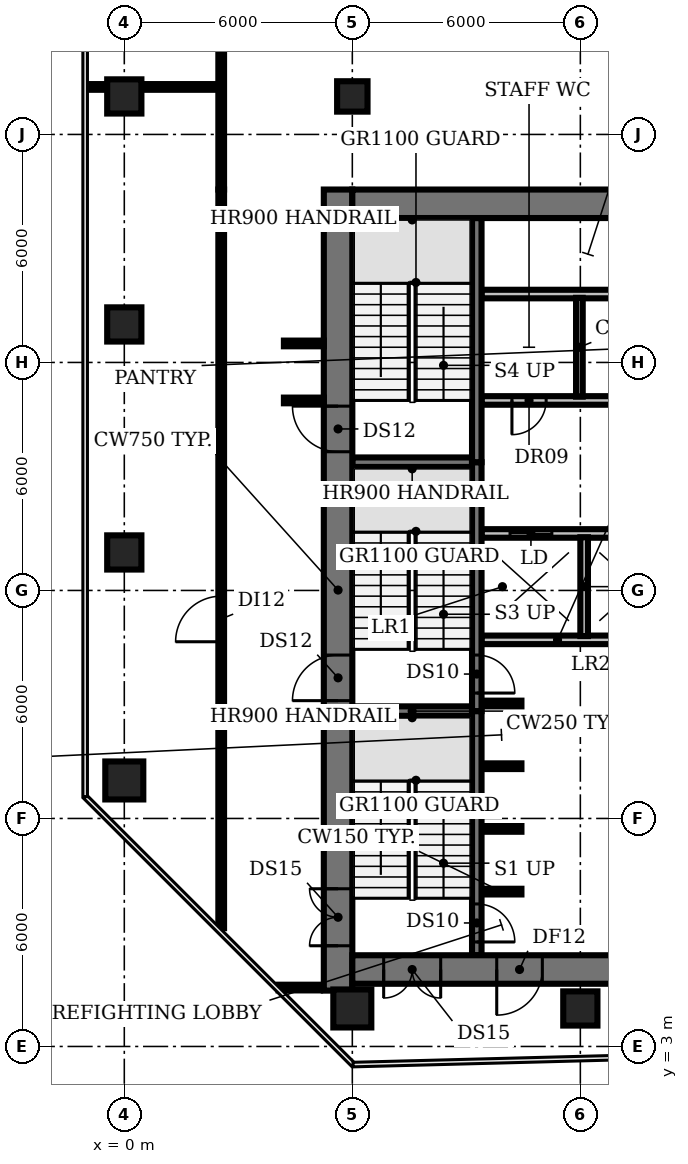
"""IFC4 building model, lengths in metres.
Left out: names, types, materials, properties, quantities, classifications, styles, units other than length and angle.
Written with IfcOpenShell. Run it as: python <this file> out.ifc"""

import sys

from ifc_helpers import new_model, si_unit, direction, frame, frame_2d, origin, origin_2d, place, context, subcontext, project, spatial, rectangle, circle, extrude, element, fill, save


model = new_model("IFC4")
c1 = context("Model", 3, precision=1e-05, world=origin(), true_north=direction((0.0, 1.0)))
c2 = subcontext(c1, "Body", "Model", "MODEL_VIEW")
j1 = project(units=[si_unit("LENGTHUNIT", "METRE"), si_unit("PLANEANGLEUNIT", "RADIAN")], contexts=[c1])
p1 = place(None, origin())
s1 = spatial("IfcSite", under=j1, at=p1, CompositionType="ELEMENT")
p2 = place(p1, origin())
s2 = spatial("IfcBuilding", under=s1, at=p2, CompositionType="ELEMENT")
p3 = place(p2, frame((0.0, 0.0, 104.6)))
s3 = spatial("IfcBuildingStorey", under=s2, at=p3, CompositionType="ELEMENT", Elevation=104.6)
p4 = place(p3, frame((0.0, 10.0, 0.0), z_axis=(0.0, 0.0, 1.0), x_axis=(1.0, 0.0, 0.0)))
e1 = element("IfcColumn", 1, at=p4, inside=s3, PredefinedType="COLUMN", context=c2, shape_type="SweptSolid", body=[
    extrude(circle(Radius=0.5, at=origin_2d()), origin(), (0.0, 0.0, 1.0), 3.85),
])
for number, where, z_axis, x_axis in (
    (2, (0.0, 16.0, 0.0), (0.0, 0.0, 1.0), (1.0, 0.0, 0.0)),
    (3, (0.0, 22.0, 0.0), (0.0, 0.0, 1.0), (1.0, 0.0, 0.0)),
    (4, (0.0, 28.0, 0.0), (0.0, 0.0, 1.0), (1.0, 0.0, 0.0)),
):
    element("IfcColumn", number, at=place(p3, frame(where, z_axis=z_axis, x_axis=x_axis)), inside=s3, PredefinedType="COLUMN", context=c2, shape_type="SweptSolid", body=[
        extrude(rectangle(XDim=0.9, YDim=0.9, at=origin_2d()), origin(), (0.0, 0.0, 1.0), 3.85),
    ])
p5 = place(p3, frame((6.0, 4.0, 0.0), z_axis=(0.0, 0.0, 1.0), x_axis=(1.0, 0.0, 0.0)))
e5 = element("IfcColumn", 5, at=p5, inside=s3, PredefinedType="COLUMN", context=c2, shape_type="SweptSolid", body=[
    extrude(circle(Radius=0.5, at=origin_2d()), origin(), (0.0, 0.0, 1.0), 3.85),
])
p6 = place(p3, frame((6.0, 28.0, 0.0), z_axis=(0.0, 0.0, 1.0), x_axis=(1.0, 0.0, 0.0)))
e6 = element("IfcColumn", 6, at=p6, inside=s3, PredefinedType="COLUMN", context=c2, shape_type="SweptSolid", body=[
    extrude(rectangle(XDim=0.8, YDim=0.8, at=origin_2d()), origin(), (0.0, 0.0, 1.0), 3.85),
])
p7 = place(p3, frame((12.0, 4.0, 0.0), z_axis=(0.0, 0.0, 1.0), x_axis=(1.0, 0.0, 0.0)))
e7 = element("IfcColumn", 7, at=p7, inside=s3, PredefinedType="COLUMN", context=c2, shape_type="SweptSolid", body=[
    extrude(rectangle(XDim=0.9, YDim=0.9, at=origin_2d()), origin(), (0.0, 0.0, 1.0), 3.85),
])
for number, where, z_axis, x_axis in (
    (8, (9.4, 7.075, 0.0), (0.0, 0.0, 1.0), (1.0, 0.0, 0.0)),
    (9, (9.4, 8.725, 0.0), (0.0, 0.0, 1.0), (1.0, 0.0, 0.0)),
    (10, (9.4, 10.375, 0.0), (0.0, 0.0, 1.0), (1.0, 0.0, 0.0)),
):
    element("IfcWall", number, at=place(p3, frame(where, z_axis=z_axis, x_axis=x_axis)), inside=s3, PredefinedType="SHEAR", context=c2, shape_type="SweptSolid", body=[
        extrude(rectangle(XDim=1.05, YDim=0.15, at=frame_2d((0.525, 0.0))), origin(), (0.0, 0.0, 1.0), 3.85),
    ])
p8 = place(p3, frame((6.0, 11.825, 0.0), z_axis=(0.0, 0.0, 1.0), x_axis=(1.0, 0.0, 0.0)))
e11 = element("IfcWall", 11, at=p8, inside=s3, PredefinedType="SHEAR", context=c2, shape_type="SweptSolid", body=[
    extrude(rectangle(XDim=3.15, YDim=0.25, at=frame_2d((1.575, 0.0))), origin(), (0.0, 0.0, 1.0), 3.85),
])
p9 = place(p3, frame((9.4, 12.025, 0.0), z_axis=(0.0, 0.0, 1.0), x_axis=(1.0, 0.0, 0.0)))
e12 = element("IfcWall", 12, at=p9, inside=s3, PredefinedType="SHEAR", context=c2, shape_type="SweptSolid", body=[
    extrude(rectangle(XDim=1.05, YDim=0.15, at=frame_2d((0.525, 0.0))), origin(), (0.0, 0.0, 1.0), 3.85),
])
p10 = place(p3, frame((9.4, 13.7, 0.0), z_axis=(0.0, 0.0, 1.0), x_axis=(1.0, 0.0, 0.0)))
e13 = element("IfcWall", 13, at=p10, inside=s3, PredefinedType="PARTITIONING", context=c2, shape_type="SweptSolid", body=[
    extrude(rectangle(XDim=4.0, YDim=0.225, at=frame_2d((2.0, 0.0))), origin(), (0.0, 0.0, 1.0), 3.85),
])
p11 = place(p3, frame((9.4, 16.5, 0.0), z_axis=(0.0, 0.0, 1.0), x_axis=(1.0, 0.0, 0.0)))
e14 = element("IfcWall", 14, at=p11, inside=s3, PredefinedType="PARTITIONING", context=c2, shape_type="SweptSolid", body=[
    extrude(rectangle(XDim=14.6, YDim=0.225, at=frame_2d((7.3, 0.0))), origin(), (0.0, 0.0, 1.0), 3.85),
])
p12 = place(p11, frame((0.75, 0.0, 0.0)))
e15 = element("IfcOpeningElement", 15, at=p12, cuts=e14, PredefinedType="OPENING", context=c2, shape_type="SweptSolid", body=[
    extrude(rectangle(XDim=1.1, YDim=2.1, at=frame_2d((0.55, 1.05))), frame((0.0, 0.123, 0.0), z_axis=(0.0, -1.0, 0.0), x_axis=(1.0, 0.0, 0.0)), (0.0, 0.0, 1.0), 0.245),
])
p13 = place(p11, frame((3.55, 0.0, 0.0)))
e16 = element("IfcOpeningElement", 16, at=p13, cuts=e14, PredefinedType="OPENING", context=c2, shape_type="SweptSolid", body=[
    extrude(rectangle(XDim=1.1, YDim=2.1, at=frame_2d((0.55, 1.05))), frame((0.0, 0.123, 0.0), z_axis=(0.0, -1.0, 0.0), x_axis=(1.0, 0.0, 0.0)), (0.0, 0.0, 1.0), 0.245),
])
p14 = place(p11, frame((6.35, 0.0, 0.0)))
e17 = element("IfcOpeningElement", 17, at=p14, cuts=e14, PredefinedType="OPENING", context=c2, shape_type="SweptSolid", body=[
    extrude(rectangle(XDim=1.1, YDim=2.1, at=frame_2d((0.55, 1.05))), frame((0.0, 0.123, 0.0), z_axis=(0.0, -1.0, 0.0), x_axis=(1.0, 0.0, 0.0)), (0.0, 0.0, 1.0), 0.245),
])
p15 = place(p11, frame((9.15, 0.0, 0.0)))
e18 = element("IfcOpeningElement", 18, at=p15, cuts=e14, PredefinedType="OPENING", context=c2, shape_type="SweptSolid", body=[
    extrude(rectangle(XDim=1.1, YDim=2.1, at=frame_2d((0.55, 1.05))), frame((0.0, 0.123, 0.0), z_axis=(0.0, -1.0, 0.0), x_axis=(1.0, 0.0, 0.0)), (0.0, 0.0, 1.0), 0.245),
])
p16 = place(p11, frame((11.647, 0.0, 0.0)))
e19 = element("IfcOpeningElement", 19, at=p16, cuts=e14, PredefinedType="OPENING", context=c2, shape_type="SweptSolid", body=[
    extrude(rectangle(XDim=0.9, YDim=2.1, at=frame_2d((0.45, 1.05))), frame((0.0, 0.123, 0.0), z_axis=(0.0, -1.0, 0.0), x_axis=(1.0, 0.0, 0.0)), (0.0, 0.0, 1.0), 0.245),
])
p17 = place(p11, frame((13.423, 0.0, 0.0)))
e20 = element("IfcOpeningElement", 20, at=p17, cuts=e14, PredefinedType="OPENING", context=c2, shape_type="SweptSolid", body=[
    extrude(rectangle(XDim=0.9, YDim=2.1, at=frame_2d((0.45, 1.05))), frame((0.0, 0.123, 0.0), z_axis=(0.0, -1.0, 0.0), x_axis=(1.0, 0.0, 0.0)), (0.0, 0.0, 1.0), 0.245),
])
p18 = place(p3, frame((6.0, 18.375, 0.0), z_axis=(0.0, 0.0, 1.0), x_axis=(1.0, 0.0, 0.0)))
e21 = element("IfcWall", 21, at=p18, inside=s3, PredefinedType="SHEAR", context=c2, shape_type="SweptSolid", body=[
    extrude(rectangle(XDim=3.15, YDim=0.25, at=frame_2d((1.575, 0.0))), origin(), (0.0, 0.0, 1.0), 3.85),
])
p19 = place(p3, frame((24.0, 20.0, 0.0), z_axis=(0.0, 0.0, 1.0), x_axis=(-1.0, 0.0, 0.0)))
e22 = element("IfcWall", 22, at=p19, inside=s3, PredefinedType="PARTITIONING", context=c2, shape_type="SweptSolid", body=[
    extrude(rectangle(XDim=14.6, YDim=0.225, at=frame_2d((7.3, 0.0))), origin(), (0.0, 0.0, 1.0), 3.85),
])
p20 = place(p19, frame((12.9, 0.0, 0.0)))
e23 = element("IfcOpeningElement", 23, at=p20, cuts=e22, PredefinedType="OPENING", context=c2, shape_type="SweptSolid", body=[
    extrude(rectangle(XDim=0.9, YDim=2.1, at=frame_2d((0.45, 1.05))), frame((0.0, 0.123, 0.0), z_axis=(0.0, -1.0, 0.0), x_axis=(1.0, 0.0, 0.0)), (0.0, 0.0, 1.0), 0.245),
])
p21 = place(p19, frame((9.475, 0.0, 0.0)))
e24 = element("IfcOpeningElement", 24, at=p21, cuts=e22, PredefinedType="OPENING", context=c2, shape_type="SweptSolid", body=[
    extrude(rectangle(XDim=1.0, YDim=2.1, at=frame_2d((0.5, 1.05))), frame((0.0, 0.123, 0.0), z_axis=(0.0, -1.0, 0.0), x_axis=(1.0, 0.0, 0.0)), (0.0, 0.0, 1.0), 0.245),
])
p22 = place(p19, frame((6.375, 0.0, 0.0)))
e25 = element("IfcOpeningElement", 25, at=p22, cuts=e22, PredefinedType="OPENING", context=c2, shape_type="SweptSolid", body=[
    extrude(rectangle(XDim=0.9, YDim=2.1, at=frame_2d((0.45, 1.05))), frame((0.0, 0.123, 0.0), z_axis=(0.0, -1.0, 0.0), x_axis=(1.0, 0.0, 0.0)), (0.0, 0.0, 1.0), 0.245),
])
p23 = place(p19, frame((4.175, 0.0, 0.0)))
e26 = element("IfcOpeningElement", 26, at=p23, cuts=e22, PredefinedType="OPENING", context=c2, shape_type="SweptSolid", body=[
    extrude(rectangle(XDim=0.9, YDim=2.1, at=frame_2d((0.45, 1.05))), frame((0.0, 0.123, 0.0), z_axis=(0.0, -1.0, 0.0), x_axis=(1.0, 0.0, 0.0)), (0.0, 0.0, 1.0), 0.245),
])
p24 = place(p19, frame((2.137, 0.0, 0.0)))
e27 = element("IfcOpeningElement", 27, at=p24, cuts=e22, PredefinedType="OPENING", context=c2, shape_type="SweptSolid", body=[
    extrude(rectangle(XDim=0.9, YDim=2.1, at=frame_2d((0.45, 1.05))), frame((0.0, 0.123, 0.0), z_axis=(0.0, -1.0, 0.0), x_axis=(1.0, 0.0, 0.0)), (0.0, 0.0, 1.0), 0.245),
])
p25 = place(p19, frame((0.363, 0.0, 0.0)))
e28 = element("IfcOpeningElement", 28, at=p25, cuts=e22, PredefinedType="OPENING", context=c2, shape_type="SweptSolid", body=[
    extrude(rectangle(XDim=0.9, YDim=2.1, at=frame_2d((0.45, 1.05))), frame((0.0, 0.123, 0.0), z_axis=(0.0, -1.0, 0.0), x_axis=(1.0, 0.0, 0.0)), (0.0, 0.0, 1.0), 0.245),
])
p26 = place(p3, frame((9.4, 22.8, 0.0), z_axis=(0.0, 0.0, 1.0), x_axis=(1.0, 0.0, 0.0)))
e29 = element("IfcWall", 29, at=p26, inside=s3, PredefinedType="PARTITIONING", context=c2, shape_type="SweptSolid", body=[
    extrude(rectangle(XDim=14.6, YDim=0.225, at=frame_2d((7.3, 0.0))), origin(), (0.0, 0.0, 1.0), 3.85),
])
p27 = place(p3, frame((9.275, 11.825, 0.0), z_axis=(0.0, 0.0, 1.0), x_axis=(0.0, -1.0, 0.0)))
e30 = element("IfcWall", 30, at=p27, inside=s3, PredefinedType="SHEAR", context=c2, shape_type="SweptSolid", body=[
    extrude(rectangle(XDim=6.425, YDim=0.25, at=frame_2d((3.212, 0.0))), origin(), (0.0, 0.0, 1.0), 3.85),
])
p28 = place(p27, frame((5.075, 0.0, 0.0)))
e31 = element("IfcOpeningElement", 31, at=p28, cuts=e30, PredefinedType="OPENING", context=c2, shape_type="SweptSolid", body=[
    extrude(rectangle(XDim=1.0, YDim=2.1, at=frame_2d((0.5, 1.05))), frame((0.0, 0.135, 0.0), z_axis=(0.0, -1.0, 0.0), x_axis=(1.0, 0.0, 0.0)), (0.0, 0.0, 1.0), 0.27),
])
p29 = place(p3, frame((9.275, 18.375, 0.0), z_axis=(0.0, 0.0, 1.0), x_axis=(0.0, -1.0, 0.0)))
e32 = element("IfcWall", 32, at=p29, inside=s3, PredefinedType="SHEAR", context=c2, shape_type="SweptSolid", body=[
    extrude(rectangle(XDim=6.55, YDim=0.25, at=frame_2d((3.275, 0.0))), origin(), (0.0, 0.0, 1.0), 3.85),
])
p30 = place(p29, frame((5.075, 0.0, 0.0)))
e33 = element("IfcOpeningElement", 33, at=p30, cuts=e32, PredefinedType="OPENING", context=c2, shape_type="SweptSolid", body=[
    extrude(rectangle(XDim=1.0, YDim=2.1, at=frame_2d((0.5, 1.05))), frame((0.0, 0.135, 0.0), z_axis=(0.0, -1.0, 0.0), x_axis=(1.0, 0.0, 0.0)), (0.0, 0.0, 1.0), 0.27),
])
p31 = place(p3, frame((9.275, 18.375, 0.0), z_axis=(0.0, 0.0, 1.0), x_axis=(0.0, 1.0, 0.0)))
e34 = element("IfcWall", 34, at=p31, inside=s3, PredefinedType="SHEAR", context=c2, shape_type="SweptSolid", body=[
    extrude(rectangle(XDim=6.425, YDim=0.25, at=frame_2d((3.212, 0.0))), origin(), (0.0, 0.0, 1.0), 3.85),
])
p32 = place(p3, frame((11.975, 20.1, 0.0), z_axis=(0.0, 0.0, 1.0), x_axis=(0.0, 1.0, 0.0)))
e35 = element("IfcWall", 35, at=p32, inside=s3, PredefinedType="PARTITIONING", context=c2, shape_type="SweptSolid", body=[
    extrude(rectangle(XDim=2.6, YDim=0.175, at=frame_2d((1.3, 0.0))), origin(), (0.0, 0.0, 1.0), 3.85),
])
p33 = place(p3, frame((12.1, 13.8, 0.0), z_axis=(0.0, 0.0, 1.0), x_axis=(0.0, 1.0, 0.0)))
e36 = element("IfcWall", 36, at=p33, inside=s3, PredefinedType="SOLIDWALL", context=c2, shape_type="SweptSolid", body=[
    extrude(rectangle(XDim=2.6, YDim=0.2, at=frame_2d((1.3, 0.0))), origin(), (0.0, 0.0, 1.0), 3.85),
])
p34 = place(p3, frame((5.625, 4.47, 0.0), z_axis=(0.0, 0.0, 1.0), x_axis=(0.0, 1.0, 0.0)))
e37 = element("IfcWall", 37, at=p34, inside=s3, PredefinedType="SHEAR", context=c2, shape_type="SweptSolid", body=[
    extrude(rectangle(XDim=21.08, YDim=0.75, at=frame_2d((10.54, 0.0))), origin(), (0.0, 0.0, 1.0), 3.85),
])
p35 = place(p34, frame((1.18, 0.0, 0.0)))
e38 = element("IfcOpeningElement", 38, at=p35, cuts=e37, PredefinedType="OPENING", context=c2, shape_type="SweptSolid", body=[
    extrude(rectangle(XDim=1.5, YDim=2.1, at=frame_2d((0.75, 1.05))), frame((0.0, 0.385, 0.0), z_axis=(0.0, -1.0, 0.0), x_axis=(1.0, 0.0, 0.0)), (0.0, 0.0, 1.0), 0.77),
])
p36 = place(p34, frame((7.63, 0.0, 0.0)))
e39 = element("IfcOpeningElement", 39, at=p36, cuts=e37, PredefinedType="OPENING", context=c2, shape_type="SweptSolid", body=[
    extrude(rectangle(XDim=1.2, YDim=2.1, at=frame_2d((0.6, 1.05))), frame((0.0, 0.385, 0.0), z_axis=(0.0, -1.0, 0.0), x_axis=(1.0, 0.0, 0.0)), (0.0, 0.0, 1.0), 0.77),
])
p37 = place(p34, frame((14.18, 0.0, 0.0)))
e40 = element("IfcOpeningElement", 40, at=p37, cuts=e37, PredefinedType="OPENING", context=c2, shape_type="SweptSolid", body=[
    extrude(rectangle(XDim=1.2, YDim=2.1, at=frame_2d((0.6, 1.05))), frame((0.0, 0.385, 0.0), z_axis=(0.0, -1.0, 0.0), x_axis=(1.0, 0.0, 0.0)), (0.0, 0.0, 1.0), 0.77),
])
p38 = place(p3, frame((24.0, 5.025, 0.0), z_axis=(0.0, 0.0, 1.0), x_axis=(-1.0, 0.0, 0.0)))
e41 = element("IfcWall", 41, at=p38, inside=s3, PredefinedType="SHEAR", context=c2, shape_type="SweptSolid", body=[
    extrude(rectangle(XDim=18.0, YDim=0.75, at=frame_2d((9.0, 0.0))), origin(), (0.0, 0.0, 1.0), 3.85),
])
p39 = place(p38, frame((0.825, 0.0, 0.0)))
e42 = element("IfcOpeningElement", 42, at=p39, cuts=e41, PredefinedType="OPENING", context=c2, shape_type="SweptSolid", body=[
    extrude(rectangle(XDim=1.5, YDim=2.1, at=frame_2d((0.75, 1.05))), frame((0.0, 0.385, 0.0), z_axis=(0.0, -1.0, 0.0), x_axis=(1.0, 0.0, 0.0)), (0.0, 0.0, 1.0), 0.77),
])
p40 = place(p38, frame((15.675, 0.0, 0.0)))
e43 = element("IfcOpeningElement", 43, at=p40, cuts=e41, PredefinedType="OPENING", context=c2, shape_type="SweptSolid", body=[
    extrude(rectangle(XDim=1.5, YDim=2.1, at=frame_2d((0.75, 1.05))), frame((0.0, 0.385, 0.0), z_axis=(0.0, -1.0, 0.0), x_axis=(1.0, 0.0, 0.0)), (0.0, 0.0, 1.0), 0.77),
])
p41 = place(p38, frame((13.0, 0.0, 0.0)))
e44 = element("IfcOpeningElement", 44, at=p41, cuts=e41, PredefinedType="OPENING", context=c2, shape_type="SweptSolid", body=[
    extrude(rectangle(XDim=1.2, YDim=2.1, at=frame_2d((0.6, 1.05))), frame((0.0, 0.385, 0.0), z_axis=(0.0, -1.0, 0.0), x_axis=(1.0, 0.0, 0.0)), (0.0, 0.0, 1.0), 0.77),
])
p42 = place(p38, frame((4.35, 0.0, 0.0)))
e45 = element("IfcOpeningElement", 45, at=p42, cuts=e41, PredefinedType="OPENING", context=c2, shape_type="SweptSolid", body=[
    extrude(rectangle(XDim=1.0, YDim=2.1, at=frame_2d((0.5, 1.05))), frame((0.0, 0.385, 0.0), z_axis=(0.0, -1.0, 0.0), x_axis=(1.0, 0.0, 0.0)), (0.0, 0.0, 1.0), 0.77),
])
p43 = place(p3, frame((6.0, 25.175, 0.0), z_axis=(0.0, 0.0, 1.0), x_axis=(1.0, 0.0, 0.0)))
e46 = element("IfcWall", 46, at=p43, inside=s3, PredefinedType="SHEAR", context=c2, shape_type="SweptSolid", body=[
    extrude(rectangle(XDim=18.0, YDim=0.75, at=frame_2d((9.0, 0.0))), origin(), (0.0, 0.0, 1.0), 3.85),
])
p44 = place(p3, frame((-0.98, 28.25, 0.0), z_axis=(0.0, 0.0, 1.0), x_axis=(1.0, 0.0, 0.0)))
e47 = element("IfcWall", 47, at=p44, inside=s3, PredefinedType="PARTITIONING", context=c2, shape_type="SweptSolid", body=[
    extrude(rectangle(XDim=3.53, YDim=0.15, at=frame_2d((1.765, 0.0))), origin(), (0.0, 0.0, 1.0), 2.83),
])
p45 = place(p3, frame((2.55, 6.113, 0.0), z_axis=(0.0, 0.0, 1.0), x_axis=(0.0, 1.0, 0.0)))
e48 = element("IfcWall", 48, at=p45, inside=s3, PredefinedType="PARTITIONING", context=c2, shape_type="SweptSolid", body=[
    extrude(rectangle(XDim=19.437, YDim=0.15, at=frame_2d((9.718, 0.0))), origin(), (0.0, 0.0, 1.0), 2.83),
])
p46 = place(p45, frame((7.537, 0.0, 0.0)))
e49 = element("IfcOpeningElement", 49, at=p46, cuts=e48, PredefinedType="OPENING", context=c2, shape_type="SweptSolid", body=[
    extrude(rectangle(XDim=1.2, YDim=2.1, at=frame_2d((0.6, 1.05))), frame((0.0, 0.085, 0.0), z_axis=(0.0, -1.0, 0.0), x_axis=(1.0, 0.0, 0.0)), (0.0, 0.0, 1.0), 0.17),
])
p47 = place(p3, frame((2.55, 25.55, 0.0), z_axis=(0.0, 0.0, 1.0), x_axis=(0.0, 1.0, 0.0)))
e50 = element("IfcWall", 50, at=p47, inside=s3, PredefinedType="PARTITIONING", context=c2, shape_type="SweptSolid", body=[
    extrude(rectangle(XDim=3.9, YDim=0.15, at=frame_2d((1.95, 0.0))), origin(), (0.0, 0.0, 1.0), 2.83),
])
p48 = place(p3, frame((4.06, 4.55, 0.0), z_axis=(0.0, 0.0, 1.0), x_axis=(1.0, 0.0, 0.0)))
e51 = element("IfcWall", 51, at=p48, inside=s3, PredefinedType="PARTITIONING", context=c2, shape_type="SweptSolid", body=[
    extrude(rectangle(XDim=1.09, YDim=0.15, at=frame_2d((0.545, 0.0))), origin(), (0.0, 0.0, 1.0), 2.83),
])
for number, where, z_axis, x_axis in (
    (52, (4.2, 20.0, 0.0), (0.0, 0.0, 1.0), (1.0, 0.0, 0.0)),
    (53, (4.2, 21.5, 0.0), (0.0, 0.0, 1.0), (1.0, 0.0, 0.0)),
):
    element("IfcWall", number, at=place(p3, frame(where, z_axis=z_axis, x_axis=x_axis)), inside=s3, PredefinedType="PARTITIONING", context=c2, shape_type="SweptSolid", body=[
        extrude(rectangle(XDim=1.05, YDim=0.15, at=frame_2d((0.525, 0.0))), origin(), (0.0, 0.0, 1.0), 2.83),
    ])
p49 = place(p12, origin())
e54 = element("IfcDoor", 54, at=p49, inside=s3, OperationType="DOUBLE_DOOR_SLIDING", PredefinedType="DOOR", context=c2, shape_type="SweptSolid", body=[
    extrude(rectangle(XDim=1.1, YDim=2.1, at=frame_2d((0.55, 1.05))), frame((0.0, 0.025, 0.0), z_axis=(0.0, -1.0, 0.0), x_axis=(1.0, 0.0, 0.0)), (0.0, 0.0, 1.0), 0.05),
])
fill(e15, e54)
p50 = place(p20, origin())
e55 = element("IfcDoor", 55, at=p50, inside=s3, OperationType="SINGLE_SWING_RIGHT", PredefinedType="DOOR", context=c2, shape_type="SweptSolid", body=[
    extrude(rectangle(XDim=0.9, YDim=2.1, at=frame_2d((0.45, 1.05))), frame((0.0, 0.025, 0.0), z_axis=(0.0, -1.0, 0.0), x_axis=(1.0, 0.0, 0.0)), (0.0, 0.0, 1.0), 0.05),
])
fill(e23, e55)
p51 = place(p28, origin())
e56 = element("IfcDoor", 56, at=p51, inside=s3, OperationType="SINGLE_SWING_RIGHT", PredefinedType="DOOR", context=c2, shape_type="SweptSolid", body=[
    extrude(rectangle(XDim=1.0, YDim=2.1, at=frame_2d((0.5, 1.05))), frame((0.0, 0.025, 0.0), z_axis=(0.0, -1.0, 0.0), x_axis=(1.0, 0.0, 0.0)), (0.0, 0.0, 1.0), 0.05),
])
fill(e31, e56)
p52 = place(p30, origin())
e57 = element("IfcDoor", 57, at=p52, inside=s3, OperationType="SINGLE_SWING_RIGHT", PredefinedType="DOOR", context=c2, shape_type="SweptSolid", body=[
    extrude(rectangle(XDim=1.0, YDim=2.1, at=frame_2d((0.5, 1.05))), frame((0.0, 0.025, 0.0), z_axis=(0.0, -1.0, 0.0), x_axis=(1.0, 0.0, 0.0)), (0.0, 0.0, 1.0), 0.05),
])
fill(e33, e57)
p53 = place(p35, origin())
e58 = element("IfcDoor", 58, at=p53, inside=s3, OperationType="DOUBLE_DOOR_SINGLE_SWING", PredefinedType="DOOR", context=c2, shape_type="SweptSolid", body=[
    extrude(rectangle(XDim=1.5, YDim=2.1, at=frame_2d((0.75, 1.05))), frame((0.0, 0.025, 0.0), z_axis=(0.0, -1.0, 0.0), x_axis=(1.0, 0.0, 0.0)), (0.0, 0.0, 1.0), 0.05),
])
fill(e38, e58)
p54 = place(p36, origin())
e59 = element("IfcDoor", 59, at=p54, inside=s3, OperationType="SINGLE_SWING_LEFT", PredefinedType="DOOR", context=c2, shape_type="SweptSolid", body=[
    extrude(rectangle(XDim=1.2, YDim=2.1, at=frame_2d((0.6, 1.05))), frame((0.0, 0.025, 0.0), z_axis=(0.0, -1.0, 0.0), x_axis=(1.0, 0.0, 0.0)), (0.0, 0.0, 1.0), 0.05),
])
fill(e39, e59)
p55 = place(p37, origin())
e60 = element("IfcDoor", 60, at=p55, inside=s3, OperationType="SINGLE_SWING_RIGHT", PredefinedType="DOOR", context=c2, shape_type="SweptSolid", body=[
    extrude(rectangle(XDim=1.2, YDim=2.1, at=frame_2d((0.6, 1.05))), frame((0.0, 0.025, 0.0), z_axis=(0.0, -1.0, 0.0), x_axis=(1.0, 0.0, 0.0)), (0.0, 0.0, 1.0), 0.05),
])
fill(e40, e60)
p56 = place(p40, origin())
e61 = element("IfcDoor", 61, at=p56, inside=s3, OperationType="DOUBLE_DOOR_SINGLE_SWING", PredefinedType="DOOR", context=c2, shape_type="SweptSolid", body=[
    extrude(rectangle(XDim=1.5, YDim=2.1, at=frame_2d((0.75, 1.05))), frame((0.0, 0.025, 0.0), z_axis=(0.0, -1.0, 0.0), x_axis=(1.0, 0.0, 0.0)), (0.0, 0.0, 1.0), 0.05),
])
fill(e43, e61)
p57 = place(p41, origin())
e62 = element("IfcDoor", 62, at=p57, inside=s3, OperationType="SINGLE_SWING_RIGHT", PredefinedType="DOOR", context=c2, shape_type="SweptSolid", body=[
    extrude(rectangle(XDim=1.2, YDim=2.1, at=frame_2d((0.6, 1.05))), frame((0.0, 0.025, 0.0), z_axis=(0.0, -1.0, 0.0), x_axis=(1.0, 0.0, 0.0)), (0.0, 0.0, 1.0), 0.05),
])
fill(e44, e62)
p58 = place(p46, origin())
e63 = element("IfcDoor", 63, at=p58, inside=s3, OperationType="SINGLE_SWING_LEFT", PredefinedType="DOOR", context=c2, shape_type="SweptSolid", body=[
    extrude(rectangle(XDim=1.2, YDim=2.1, at=frame_2d((0.6, 1.05))), frame((0.0, 0.025, 0.0), z_axis=(0.0, -1.0, 0.0), x_axis=(1.0, 0.0, 0.0)), (0.0, 0.0, 1.0), 0.05),
])
fill(e49, e63)
save(model, sys.argv[1])
